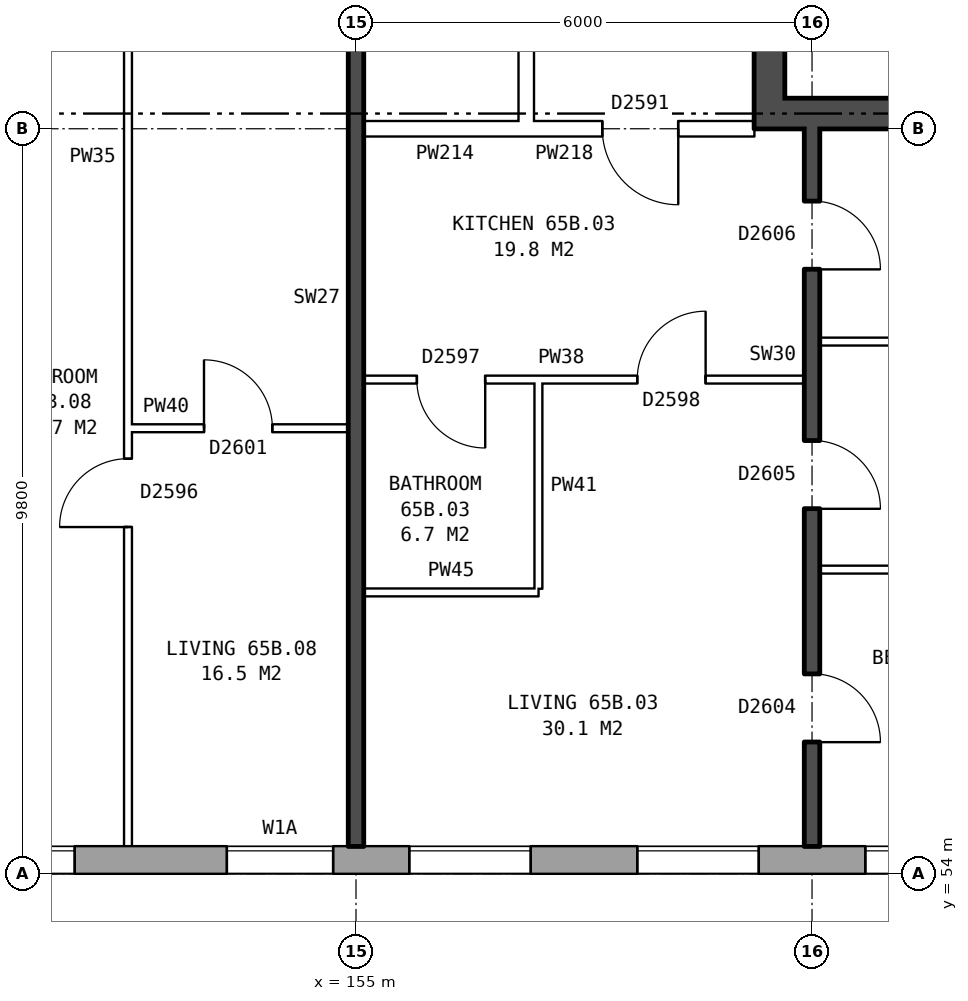
"""IFC4 building model, lengths in metres.
Left out: names, types, materials, properties, quantities, classifications, styles, units other than length and angle.
Written with IfcOpenShell. Run it as: python <this file> out.ifc"""

import sys

from ifc_helpers import new_model, si_unit, direction, frame, frame_2d, origin, place, context, subcontext, project, spatial, rectangle, extrude, element, fill, save


model = new_model("IFC4")
c1 = context("Model", 3, precision=1e-05, world=origin(), true_north=direction((0.0, 1.0)))
c2 = subcontext(c1, "Body", "Model", "MODEL_VIEW")
j1 = project(units=[si_unit("LENGTHUNIT", "METRE"), si_unit("PLANEANGLEUNIT", "RADIAN")], contexts=[c1])
p1 = place(None, origin())
s1 = spatial("IfcSite", under=j1, at=p1, CompositionType="ELEMENT")
p2 = place(p1, origin())
s2 = spatial("IfcBuilding", under=s1, at=p2, CompositionType="ELEMENT")
p3 = place(p2, frame((0.0, 0.0, 230.7)))
s3 = spatial("IfcBuildingStorey", under=s2, at=p3, CompositionType="ELEMENT", Elevation=230.7)
p4 = place(p3, frame((132.05, 54.18, 0.0), z_axis=(0.0, 0.0, 1.0), x_axis=(1.0, 0.0, 0.0)))
e1 = element("IfcWall", 1, at=p4, inside=s3, PredefinedType="STANDARD", context=c2, shape_type="SweptSolid", body=[
    extrude(rectangle(XDim=33.875, YDim=0.36, at=frame_2d((16.938, 0.0))), origin(), (0.0, 0.0, 1.0), 2.85),
])
p5 = place(p4, frame((2.65, 0.0, 0.8)))
e2 = element("IfcOpeningElement", 2, at=p5, cuts=e1, PredefinedType="OPENING", context=c2, shape_type="SweptSolid", body=[
    extrude(rectangle(XDim=1.6, YDim=1.8, at=frame_2d((0.8, 0.9))), frame((0.0, 0.19, 0.0), z_axis=(0.0, -1.0, 0.0), x_axis=(1.0, 0.0, 0.0)), (0.0, 0.0, 1.0), 0.38),
])
p6 = place(p4, frame((5.65, 0.0, 0.8)))
e3 = element("IfcOpeningElement", 3, at=p6, cuts=e1, PredefinedType="OPENING", context=c2, shape_type="SweptSolid", body=[
    extrude(rectangle(XDim=1.6, YDim=1.8, at=frame_2d((0.8, 0.9))), frame((0.0, 0.19, 0.0), z_axis=(0.0, -1.0, 0.0), x_axis=(1.0, 0.0, 0.0)), (0.0, 0.0, 1.0), 0.38),
])
p7 = place(p4, frame((8.65, 0.0, 0.8)))
e4 = element("IfcOpeningElement", 4, at=p7, cuts=e1, PredefinedType="OPENING", context=c2, shape_type="SweptSolid", body=[
    extrude(rectangle(XDim=1.6, YDim=1.8, at=frame_2d((0.8, 0.9))), frame((0.0, 0.19, 0.0), z_axis=(0.0, -1.0, 0.0), x_axis=(1.0, 0.0, 0.0)), (0.0, 0.0, 1.0), 0.38),
])
p8 = place(p4, frame((11.65, 0.0, 0.8)))
e5 = element("IfcOpeningElement", 5, at=p8, cuts=e1, PredefinedType="OPENING", context=c2, shape_type="SweptSolid", body=[
    extrude(rectangle(XDim=1.6, YDim=1.8, at=frame_2d((0.8, 0.9))), frame((0.0, 0.19, 0.0), z_axis=(0.0, -1.0, 0.0), x_axis=(1.0, 0.0, 0.0)), (0.0, 0.0, 1.0), 0.38),
])
p9 = place(p4, frame((14.1, 0.0, 1.25)))
e6 = element("IfcOpeningElement", 6, at=p9, cuts=e1, PredefinedType="OPENING", context=c2, shape_type="SweptSolid", body=[
    extrude(rectangle(XDim=0.8, YDim=1.2, at=frame_2d((0.4, 0.6))), frame((0.0, 0.19, 0.0), z_axis=(0.0, -1.0, 0.0), x_axis=(1.0, 0.0, 0.0)), (0.0, 0.0, 1.0), 0.38),
])
p10 = place(p4, frame((17.65, 0.0, 0.8)))
e7 = element("IfcOpeningElement", 7, at=p10, cuts=e1, PredefinedType="OPENING", context=c2, shape_type="SweptSolid", body=[
    extrude(rectangle(XDim=1.6, YDim=1.8, at=frame_2d((0.8, 0.9))), frame((0.0, 0.19, 0.0), z_axis=(0.0, -1.0, 0.0), x_axis=(1.0, 0.0, 0.0)), (0.0, 0.0, 1.0), 0.38),
])
p11 = place(p4, frame((21.25, 0.0, 0.8)))
e8 = element("IfcOpeningElement", 8, at=p11, cuts=e1, PredefinedType="OPENING", context=c2, shape_type="SweptSolid", body=[
    extrude(rectangle(XDim=1.4, YDim=1.8, at=frame_2d((0.7, 0.9))), frame((0.0, 0.19, 0.0), z_axis=(0.0, -1.0, 0.0), x_axis=(1.0, 0.0, 0.0)), (0.0, 0.0, 1.0), 0.38),
])
p12 = place(p4, frame((23.65, 0.0, 0.8)))
e9 = element("IfcOpeningElement", 9, at=p12, cuts=e1, PredefinedType="OPENING", context=c2, shape_type="SweptSolid", body=[
    extrude(rectangle(XDim=1.6, YDim=1.8, at=frame_2d((0.8, 0.9))), frame((0.0, 0.19, 0.0), z_axis=(0.0, -1.0, 0.0), x_axis=(1.0, 0.0, 0.0)), (0.0, 0.0, 1.0), 0.38),
])
p13 = place(p4, frame((26.65, 0.0, 0.8)))
e10 = element("IfcOpeningElement", 10, at=p13, cuts=e1, PredefinedType="OPENING", context=c2, shape_type="SweptSolid", body=[
    extrude(rectangle(XDim=1.6, YDim=1.8, at=frame_2d((0.8, 0.9))), frame((0.0, 0.19, 0.0), z_axis=(0.0, -1.0, 0.0), x_axis=(1.0, 0.0, 0.0)), (0.0, 0.0, 1.0), 0.38),
])
p14 = place(p4, frame((29.65, 0.0, 0.8)))
e11 = element("IfcOpeningElement", 11, at=p14, cuts=e1, PredefinedType="OPENING", context=c2, shape_type="SweptSolid", body=[
    extrude(rectangle(XDim=1.6, YDim=1.8, at=frame_2d((0.8, 0.9))), frame((0.0, 0.19, 0.0), z_axis=(0.0, -1.0, 0.0), x_axis=(1.0, 0.0, 0.0)), (0.0, 0.0, 1.0), 0.38),
])
p15 = place(p4, frame((16.1, 0.0, 0.15)))
e12 = element("IfcOpeningElement", 12, at=p15, cuts=e1, PredefinedType="OPENING", context=c2, shape_type="SweptSolid", body=[
    extrude(rectangle(XDim=0.6, YDim=1.2, at=frame_2d((0.3, 0.6))), frame((0.0, 0.19, 0.0), z_axis=(0.0, -1.0, 0.0), x_axis=(1.0, 0.0, 0.0)), (0.0, 0.0, 1.0), 0.38),
])
p16 = place(p3, frame((160.44, 76.2, 0.0), z_axis=(0.0, 0.0, 1.0), x_axis=(0.0, -1.0, 0.0)))
e13 = element("IfcWall", 13, at=p16, inside=s3, PredefinedType="SHEAR", context=c2, shape_type="SweptSolid", body=[
    extrude(rectangle(XDim=12.4, YDim=0.4, at=frame_2d((6.2, 0.0))), origin(), (0.0, 0.0, 1.0), 2.85),
])
p17 = place(p16, frame((1.325, 0.0, 0.0)))
e14 = element("IfcOpeningElement", 14, at=p17, cuts=e13, PredefinedType="OPENING", context=c2, shape_type="SweptSolid", body=[
    extrude(rectangle(XDim=1.1, YDim=2.1, at=frame_2d((0.55, 1.05))), frame((0.0, 0.21, 0.0), z_axis=(0.0, -1.0, 0.0), x_axis=(1.0, 0.0, 0.0)), (0.0, 0.0, 1.0), 0.42),
])
p18 = place(p16, frame((4.825, 0.0, 0.0)))
e15 = element("IfcOpeningElement", 15, at=p18, cuts=e13, PredefinedType="OPENING", context=c2, shape_type="SweptSolid", body=[
    extrude(rectangle(XDim=0.85, YDim=2.1, at=frame_2d((0.425, 1.05))), frame((0.0, 0.21, 0.0), z_axis=(0.0, -1.0, 0.0), x_axis=(1.0, 0.0, 0.0)), (0.0, 0.0, 1.0), 0.42),
])
p19 = place(p16, frame((9.9, 0.0, 0.0)))
e16 = element("IfcOpeningElement", 16, at=p19, cuts=e13, PredefinedType="OPENING", context=c2, shape_type="SweptSolid", body=[
    extrude(rectangle(XDim=1.1, YDim=2.1, at=frame_2d((0.55, 1.05))), frame((0.0, 0.21, 0.0), z_axis=(0.0, -1.0, 0.0), x_axis=(1.0, 0.0, 0.0)), (0.0, 0.0, 1.0), 0.42),
])
p20 = place(p16, frame((8.125, 0.0, 0.0)))
e17 = element("IfcOpeningElement", 17, at=p20, cuts=e13, PredefinedType="OPENING", context=c2, shape_type="SweptSolid", body=[
    extrude(rectangle(XDim=0.85, YDim=2.1, at=frame_2d((0.425, 1.05))), frame((0.0, 0.21, 0.0), z_axis=(0.0, -1.0, 0.0), x_axis=(1.0, 0.0, 0.0)), (0.0, 0.0, 1.0), 0.42),
])
p21 = place(p3, frame((160.64, 64.0, 0.0), z_axis=(0.0, 0.0, 1.0), x_axis=(1.0, 0.0, 0.0)))
e18 = element("IfcWall", 18, at=p21, inside=s3, PredefinedType="SHEAR", context=c2, shape_type="SweptSolid", body=[
    extrude(rectangle(XDim=7.6, YDim=0.4, at=frame_2d((3.8, 0.0))), origin(), (0.0, 0.0, 1.0), 2.85),
])
p22 = place(p3, frame((157.24, 63.9, 0.0), z_axis=(0.0, 0.0, 1.0), x_axis=(0.0, 1.0, 0.0)))
e19 = element("IfcWall", 19, at=p22, inside=s3, PredefinedType="PARTITIONING", context=c2, shape_type="SweptSolid", body=[
    extrude(rectangle(XDim=12.2, YDim=0.2, at=frame_2d((6.1, 0.0))), origin(), (0.0, 0.0, 1.0), 2.85),
])
p23 = place(p22, frame((5.1, 0.0, 0.0)))
e20 = element("IfcOpeningElement", 20, at=p23, cuts=e19, PredefinedType="OPENING", context=c2, shape_type="SweptSolid", body=[
    extrude(rectangle(XDim=2.0, YDim=2.1, at=frame_2d((1.0, 1.05))), frame((0.0, 0.11, 0.0), z_axis=(0.0, -1.0, 0.0), x_axis=(1.0, 0.0, 0.0)), (0.0, 0.0, 1.0), 0.22),
])
p24 = place(p3, frame((155.1, 57.7, 0.0), z_axis=(0.0, 0.0, 1.0), x_axis=(1.0, 0.0, 0.0)))
e21 = element("IfcWall", 21, at=p24, inside=s3, PredefinedType="PARTITIONING", context=c2, shape_type="SweptSolid", body=[
    extrude(rectangle(XDim=2.3, YDim=0.1, at=frame_2d((1.15, 0.0))), origin(), (0.0, 0.0, 1.0), 2.85),
])
p25 = place(p3, frame((161.1, 58.0, 0.0), z_axis=(0.0, 0.0, 1.0), x_axis=(1.0, 0.0, 0.0)))
e22 = element("IfcWall", 22, at=p25, inside=s3, PredefinedType="PARTITIONING", context=c2, shape_type="SweptSolid", body=[
    extrude(rectangle(XDim=7.54, YDim=0.1, at=frame_2d((3.77, 0.0))), origin(), (0.0, 0.0, 1.0), 2.85),
])
p26 = place(p3, frame((152.0, 59.86, 0.0), z_axis=(0.0, 0.0, 1.0), x_axis=(1.0, 0.0, 0.0)))
e23 = element("IfcWall", 23, at=p26, inside=s3, PredefinedType="PARTITIONING", context=c2, shape_type="SweptSolid", body=[
    extrude(rectangle(XDim=2.9, YDim=0.1, at=frame_2d((1.45, 0.0))), origin(), (0.0, 0.0, 1.0), 2.85),
])
p27 = place(p26, frame((1.0, 0.0, 0.0)))
e24 = element("IfcOpeningElement", 24, at=p27, cuts=e23, PredefinedType="OPENING", context=c2, shape_type="SweptSolid", body=[
    extrude(rectangle(XDim=0.9, YDim=2.1, at=frame_2d((0.45, 1.05))), frame((0.0, 0.06, 0.0), z_axis=(0.0, -1.0, 0.0), x_axis=(1.0, 0.0, 0.0)), (0.0, 0.0, 1.0), 0.12),
])
p28 = place(p3, frame((155.1, 60.5, 0.0), z_axis=(0.0, 0.0, 1.0), x_axis=(1.0, 0.0, 0.0)))
e25 = element("IfcWall", 25, at=p28, inside=s3, PredefinedType="PARTITIONING", context=c2, shape_type="SweptSolid", body=[
    extrude(rectangle(XDim=5.8, YDim=0.1, at=frame_2d((2.9, 0.0))), origin(), (0.0, 0.0, 1.0), 2.85),
])
p29 = place(p28, frame((3.6, 0.0, 0.0)))
e26 = element("IfcOpeningElement", 26, at=p29, cuts=e25, PredefinedType="OPENING", context=c2, shape_type="SweptSolid", body=[
    extrude(rectangle(XDim=0.9, YDim=2.1, at=frame_2d((0.45, 1.05))), frame((0.0, 0.06, 0.0), z_axis=(0.0, -1.0, 0.0), x_axis=(1.0, 0.0, 0.0)), (0.0, 0.0, 1.0), 0.12),
])
p30 = place(p28, frame((0.7, 0.0, 0.0)))
e27 = element("IfcOpeningElement", 27, at=p30, cuts=e25, PredefinedType="OPENING", context=c2, shape_type="SweptSolid", body=[
    extrude(rectangle(XDim=0.9, YDim=2.1, at=frame_2d((0.45, 1.05))), frame((0.0, 0.06, 0.0), z_axis=(0.0, -1.0, 0.0), x_axis=(1.0, 0.0, 0.0)), (0.0, 0.0, 1.0), 0.12),
])
p31 = place(p3, frame((161.1, 61.0, 0.0), z_axis=(0.0, 0.0, 1.0), x_axis=(1.0, 0.0, 0.0)))
e28 = element("IfcWall", 28, at=p31, inside=s3, PredefinedType="PARTITIONING", context=c2, shape_type="SweptSolid", body=[
    extrude(rectangle(XDim=7.54, YDim=0.1, at=frame_2d((3.77, 0.0))), origin(), (0.0, 0.0, 1.0), 2.85),
])
p32 = place(p3, frame((155.1, 63.8, 0.0), z_axis=(0.0, 0.0, 1.0), x_axis=(1.0, 0.0, 0.0)))
e29 = element("IfcWall", 29, at=p32, inside=s3, PredefinedType="PARTITIONING", context=c2, shape_type="SweptSolid", body=[
    extrude(rectangle(XDim=2.14, YDim=0.2, at=frame_2d((1.07, 0.0))), origin(), (0.0, 0.0, 1.0), 2.85),
])
p33 = place(p3, frame((157.24, 63.8, 0.0), z_axis=(0.0, 0.0, 1.0), x_axis=(1.0, 0.0, 0.0)))
e30 = element("IfcWall", 30, at=p33, inside=s3, PredefinedType="PARTITIONING", context=c2, shape_type="SweptSolid", body=[
    extrude(rectangle(XDim=3.0, YDim=0.2, at=frame_2d((1.5, 0.0))), origin(), (0.0, 0.0, 1.0), 2.85),
])
p34 = place(p33, frame((1.0, 0.0, 0.0)))
e31 = element("IfcOpeningElement", 31, at=p34, cuts=e30, PredefinedType="OPENING", context=c2, shape_type="SweptSolid", body=[
    extrude(rectangle(XDim=1.0, YDim=2.1, at=frame_2d((0.5, 1.05))), frame((0.0, 0.11, 0.0), z_axis=(0.0, -1.0, 0.0), x_axis=(1.0, 0.0, 0.0)), (0.0, 0.0, 1.0), 0.22),
])
p35 = place(p3, frame((152.0, 54.36, 0.0), z_axis=(0.0, 0.0, 1.0), x_axis=(0.0, 1.0, 0.0)))
e32 = element("IfcWall", 32, at=p35, inside=s3, PredefinedType="PARTITIONING", context=c2, shape_type="SweptSolid", body=[
    extrude(rectangle(XDim=14.34, YDim=0.1, at=frame_2d((7.17, 0.0))), origin(), (0.0, 0.0, 1.0), 2.85),
])
p36 = place(p35, frame((4.2, 0.0, 0.0)))
e33 = element("IfcOpeningElement", 33, at=p36, cuts=e32, PredefinedType="OPENING", context=c2, shape_type="SweptSolid", body=[
    extrude(rectangle(XDim=0.9, YDim=2.1, at=frame_2d((0.45, 1.05))), frame((0.0, 0.06, 0.0), z_axis=(0.0, -1.0, 0.0), x_axis=(1.0, 0.0, 0.0)), (0.0, 0.0, 1.0), 0.12),
])
p37 = place(p35, frame((13.04, 0.0, 0.0)))
e34 = element("IfcOpeningElement", 34, at=p37, cuts=e32, PredefinedType="OPENING", context=c2, shape_type="SweptSolid", body=[
    extrude(rectangle(XDim=0.9, YDim=2.1, at=frame_2d((0.45, 1.05))), frame((0.0, 0.06, 0.0), z_axis=(0.0, -1.0, 0.0), x_axis=(1.0, 0.0, 0.0)), (0.0, 0.0, 1.0), 0.12),
])
p38 = place(p3, frame((155.0, 54.36, 0.0), z_axis=(0.0, 0.0, 1.0), x_axis=(0.0, 1.0, 0.0)))
e35 = element("IfcWall", 35, at=p38, inside=s3, PredefinedType="SOLIDWALL", context=c2, shape_type="SweptSolid", body=[
    extrude(rectangle(XDim=14.44, YDim=0.2, at=frame_2d((7.22, 0.0))), origin(), (0.0, 0.0, 1.0), 2.85),
])
p39 = place(p3, frame((157.4, 57.75, 0.0), z_axis=(0.0, 0.0, 1.0), x_axis=(0.0, 1.0, 0.0)))
e36 = element("IfcWall", 36, at=p39, inside=s3, PredefinedType="PARTITIONING", context=c2, shape_type="SweptSolid", body=[
    extrude(rectangle(XDim=2.7, YDim=0.1, at=frame_2d((1.35, 0.0))), origin(), (0.0, 0.0, 1.0), 2.85),
])
p40 = place(p3, frame((161.0, 54.36, 0.0), z_axis=(0.0, 0.0, 1.0), x_axis=(0.0, 1.0, 0.0)))
e37 = element("IfcWall", 37, at=p40, inside=s3, PredefinedType="SOLIDWALL", context=c2, shape_type="SweptSolid", body=[
    extrude(rectangle(XDim=9.44, YDim=0.2, at=frame_2d((4.72, 0.0))), origin(), (0.0, 0.0, 1.0), 2.85),
])
p41 = place(p40, frame((1.37, 0.0, 0.0)))
e38 = element("IfcOpeningElement", 38, at=p41, cuts=e37, PredefinedType="OPENING", context=c2, shape_type="SweptSolid", body=[
    extrude(rectangle(XDim=0.9, YDim=2.1, at=frame_2d((0.45, 1.05))), frame((0.0, 0.11, 0.0), z_axis=(0.0, -1.0, 0.0), x_axis=(1.0, 0.0, 0.0)), (0.0, 0.0, 1.0), 0.22),
])
p42 = place(p40, frame((4.44, 0.0, 0.0)))
e39 = element("IfcOpeningElement", 39, at=p42, cuts=e37, PredefinedType="OPENING", context=c2, shape_type="SweptSolid", body=[
    extrude(rectangle(XDim=0.9, YDim=2.1, at=frame_2d((0.45, 1.05))), frame((0.0, 0.11, 0.0), z_axis=(0.0, -1.0, 0.0), x_axis=(1.0, 0.0, 0.0)), (0.0, 0.0, 1.0), 0.22),
])
p43 = place(p40, frame((7.59, 0.0, 0.0)))
e40 = element("IfcOpeningElement", 40, at=p43, cuts=e37, PredefinedType="OPENING", context=c2, shape_type="SweptSolid", body=[
    extrude(rectangle(XDim=0.9, YDim=2.1, at=frame_2d((0.45, 1.05))), frame((0.0, 0.11, 0.0), z_axis=(0.0, -1.0, 0.0), x_axis=(1.0, 0.0, 0.0)), (0.0, 0.0, 1.0), 0.22),
])
p44 = place(p10, origin())
e41 = element("IfcWindow", 41, at=p44, inside=s3, PartitioningType="SINGLE_PANEL", PredefinedType="WINDOW", context=c2, shape_type="SweptSolid", body=[
    extrude(rectangle(XDim=1.6, YDim=1.8, at=frame_2d((0.8, 0.9))), frame((0.0, 0.15, 0.0), z_axis=(0.0, -1.0, 0.0), x_axis=(1.0, 0.0, 0.0)), (0.0, 0.0, 1.0), 0.06),
])
fill(e7, e41)
p45 = place(p11, origin())
e42 = element("IfcWindow", 42, at=p45, inside=s3, PartitioningType="SINGLE_PANEL", PredefinedType="WINDOW", context=c2, shape_type="SweptSolid", body=[
    extrude(rectangle(XDim=1.4, YDim=1.8, at=frame_2d((0.7, 0.9))), frame((0.0, 0.15, 0.0), z_axis=(0.0, -1.0, 0.0), x_axis=(1.0, 0.0, 0.0)), (0.0, 0.0, 1.0), 0.06),
])
fill(e8, e42)
p46 = place(p12, origin())
e43 = element("IfcWindow", 43, at=p46, inside=s3, PartitioningType="SINGLE_PANEL", PredefinedType="WINDOW", context=c2, shape_type="SweptSolid", body=[
    extrude(rectangle(XDim=1.6, YDim=1.8, at=frame_2d((0.8, 0.9))), frame((0.0, 0.15, 0.0), z_axis=(0.0, -1.0, 0.0), x_axis=(1.0, 0.0, 0.0)), (0.0, 0.0, 1.0), 0.06),
])
fill(e9, e43)
p47 = place(p13, origin())
e44 = element("IfcWindow", 44, at=p47, inside=s3, PartitioningType="SINGLE_PANEL", PredefinedType="WINDOW", context=c2, shape_type="SweptSolid", body=[
    extrude(rectangle(XDim=1.6, YDim=1.8, at=frame_2d((0.8, 0.9))), frame((0.0, 0.15, 0.0), z_axis=(0.0, -1.0, 0.0), x_axis=(1.0, 0.0, 0.0)), (0.0, 0.0, 1.0), 0.06),
])
fill(e10, e44)
p48 = place(p14, origin())
e45 = element("IfcWindow", 45, at=p48, inside=s3, PartitioningType="SINGLE_PANEL", PredefinedType="WINDOW", context=c2, shape_type="SweptSolid", body=[
    extrude(rectangle(XDim=1.6, YDim=1.8, at=frame_2d((0.8, 0.9))), frame((0.0, 0.15, 0.0), z_axis=(0.0, -1.0, 0.0), x_axis=(1.0, 0.0, 0.0)), (0.0, 0.0, 1.0), 0.06),
])
fill(e11, e45)
p49 = place(p41, frame((0.9, 0.0, 0.0), z_axis=(0.0, 0.0, 1.0), x_axis=(-1.0, 0.0, 0.0)))
e46 = element("IfcDoor", 46, at=p49, inside=s3, OperationType="SINGLE_SWING_RIGHT", PredefinedType="DOOR", context=c2, shape_type="SweptSolid", body=[
    extrude(rectangle(XDim=0.9, YDim=2.1, at=frame_2d((0.45, 1.05))), frame((0.0, 0.025, 0.0), z_axis=(0.0, -1.0, 0.0), x_axis=(1.0, 0.0, 0.0)), (0.0, 0.0, 1.0), 0.05),
])
fill(e38, e46)
p50 = place(p42, frame((0.9, 0.0, 0.0), z_axis=(0.0, 0.0, 1.0), x_axis=(-1.0, 0.0, 0.0)))
e47 = element("IfcDoor", 47, at=p50, inside=s3, OperationType="SINGLE_SWING_RIGHT", PredefinedType="DOOR", context=c2, shape_type="SweptSolid", body=[
    extrude(rectangle(XDim=0.9, YDim=2.1, at=frame_2d((0.45, 1.05))), frame((0.0, 0.025, 0.0), z_axis=(0.0, -1.0, 0.0), x_axis=(1.0, 0.0, 0.0)), (0.0, 0.0, 1.0), 0.05),
])
fill(e39, e47)
p51 = place(p43, frame((0.9, 0.0, 0.0), z_axis=(0.0, 0.0, 1.0), x_axis=(-1.0, 0.0, 0.0)))
e48 = element("IfcDoor", 48, at=p51, inside=s3, OperationType="SINGLE_SWING_RIGHT", PredefinedType="DOOR", context=c2, shape_type="SweptSolid", body=[
    extrude(rectangle(XDim=0.9, YDim=2.1, at=frame_2d((0.45, 1.05))), frame((0.0, 0.025, 0.0), z_axis=(0.0, -1.0, 0.0), x_axis=(1.0, 0.0, 0.0)), (0.0, 0.0, 1.0), 0.05),
])
fill(e40, e48)
p52 = place(p34, frame((1.0, 0.0, 0.0), z_axis=(0.0, 0.0, 1.0), x_axis=(-1.0, 0.0, 0.0)))
e49 = element("IfcDoor", 49, at=p52, inside=s3, OperationType="SINGLE_SWING_LEFT", PredefinedType="DOOR", context=c2, shape_type="SweptSolid", body=[
    extrude(rectangle(XDim=1.0, YDim=2.1, at=frame_2d((0.5, 1.05))), frame((0.0, 0.025, 0.0), z_axis=(0.0, -1.0, 0.0), x_axis=(1.0, 0.0, 0.0)), (0.0, 0.0, 1.0), 0.05),
])
fill(e31, e49)
p53 = place(p29, origin())
e50 = element("IfcDoor", 50, at=p53, inside=s3, OperationType="SINGLE_SWING_RIGHT", PredefinedType="DOOR", context=c2, shape_type="SweptSolid", body=[
    extrude(rectangle(XDim=0.9, YDim=2.1, at=frame_2d((0.45, 1.05))), frame((0.0, 0.025, 0.0), z_axis=(0.0, -1.0, 0.0), x_axis=(1.0, 0.0, 0.0)), (0.0, 0.0, 1.0), 0.05),
])
fill(e26, e50)
p54 = place(p30, frame((0.9, 0.0, 0.0), z_axis=(0.0, 0.0, 1.0), x_axis=(-1.0, 0.0, 0.0)))
e51 = element("IfcDoor", 51, at=p54, inside=s3, OperationType="SINGLE_SWING_LEFT", PredefinedType="DOOR", context=c2, shape_type="SweptSolid", body=[
    extrude(rectangle(XDim=0.9, YDim=2.1, at=frame_2d((0.45, 1.05))), frame((0.0, 0.025, 0.0), z_axis=(0.0, -1.0, 0.0), x_axis=(1.0, 0.0, 0.0)), (0.0, 0.0, 1.0), 0.05),
])
fill(e27, e51)
p55 = place(p36, origin())
e52 = element("IfcDoor", 52, at=p55, inside=s3, OperationType="SINGLE_SWING_LEFT", PredefinedType="DOOR", context=c2, shape_type="SweptSolid", body=[
    extrude(rectangle(XDim=0.9, YDim=2.1, at=frame_2d((0.45, 1.05))), frame((0.0, 0.025, 0.0), z_axis=(0.0, -1.0, 0.0), x_axis=(1.0, 0.0, 0.0)), (0.0, 0.0, 1.0), 0.05),
])
fill(e33, e52)
p56 = place(p27, origin())
e53 = element("IfcDoor", 53, at=p56, inside=s3, OperationType="SINGLE_SWING_LEFT", PredefinedType="DOOR", context=c2, shape_type="SweptSolid", body=[
    extrude(rectangle(XDim=0.9, YDim=2.1, at=frame_2d((0.45, 1.05))), frame((0.0, 0.025, 0.0), z_axis=(0.0, -1.0, 0.0), x_axis=(1.0, 0.0, 0.0)), (0.0, 0.0, 1.0), 0.05),
])
fill(e24, e53)
save(model, sys.argv[1])
